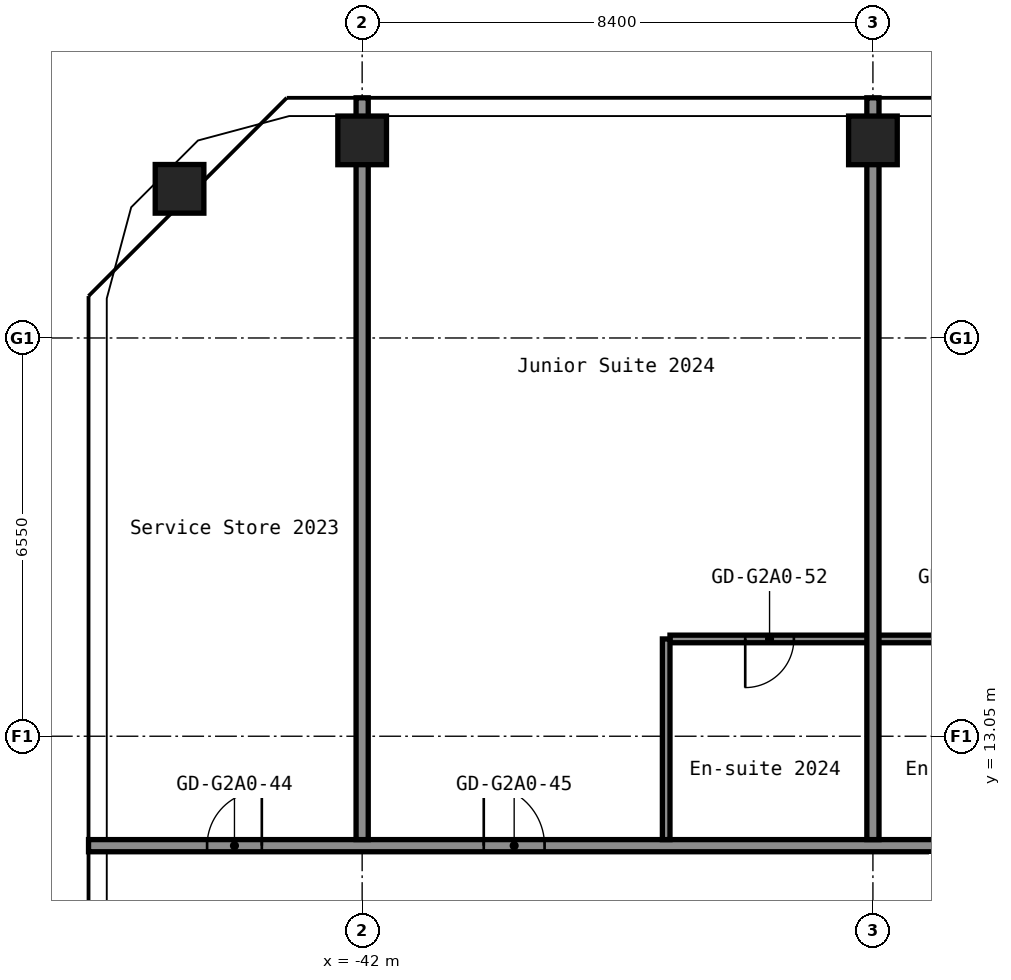
"""IFC4 building model, lengths in metres.
Left out: names, types, materials, properties, quantities, classifications, styles, units other than length and angle.
Written with IfcOpenShell. Run it as: python <this file> out.ifc"""

import sys

from ifc_helpers import new_model, si_unit, direction, frame, frame_2d, origin, origin_2d, place, context, subcontext, project, spatial, rectangle, hollow_rectangle, extrude, element, fill, save


model = new_model("IFC4")
c1 = context("Model", 3, precision=1e-05, world=origin(), true_north=direction((0.0, 1.0)))
c2 = subcontext(c1, "Body", "Model", "MODEL_VIEW")
j1 = project(units=[si_unit("LENGTHUNIT", "METRE"), si_unit("PLANEANGLEUNIT", "RADIAN")], contexts=[c1])
p1 = place(None, origin())
s1 = spatial("IfcSite", under=j1, at=p1, CompositionType="ELEMENT")
p2 = place(p1, origin())
s2 = spatial("IfcBuilding", under=s1, at=p2, CompositionType="ELEMENT")
p3 = place(p2, frame((0.0, 0.0, 75.4)))
s3 = spatial("IfcBuildingStorey", under=s2, at=p3, CompositionType="ELEMENT", Elevation=75.4)
for number, where, z_axis, x_axis in (
    (1, (-45.003, 22.053, 0.0), (0.0, 0.0, 1.0), (1.0, 0.0, 0.0)),
    (2, (-42.0, 22.85, 0.0), (0.0, 0.0, 1.0), (1.0, 0.0, 0.0)),
    (3, (-33.6, 22.85, 0.0), (0.0, 0.0, 1.0), (1.0, 0.0, 0.0)),
):
    element("IfcColumn", number, at=place(p3, frame(where, z_axis=z_axis, x_axis=x_axis)), inside=s3, PredefinedType="COLUMN", context=c2, shape_type="SweptSolid", body=[
        extrude(hollow_rectangle(XDim=0.8, YDim=0.8, WallThickness=0.032, at=origin_2d()), origin(), (0.0, 0.0, 1.0), 2.8),
    ])
p4 = place(p3, frame((-46.5, 11.25, 0.0), z_axis=(0.0, 0.0, 1.0), x_axis=(1.0, 0.0, 0.0)))
e4 = element("IfcWall", 4, at=p4, inside=s3, PredefinedType="PARTITIONING", context=c2, shape_type="SweptSolid", body=[
    extrude(rectangle(XDim=29.7, YDim=0.2, at=frame_2d((14.85, 0.0))), origin(), (0.0, 0.0, 1.0), 2.8),
])
p5 = place(p4, frame((1.95, 0.0, 0.0)))
e5 = element("IfcOpeningElement", 5, at=p5, cuts=e4, PredefinedType="OPENING", context=c2, shape_type="SweptSolid", body=[
    extrude(rectangle(XDim=0.9, YDim=2.1, at=frame_2d((0.45, 1.05))), frame((0.0, 0.11, 0.0), z_axis=(0.0, -1.0, 0.0), x_axis=(1.0, 0.0, 0.0)), (0.0, 0.0, 1.0), 0.22),
])
p6 = place(p4, frame((6.5, 0.0, 0.0)))
e6 = element("IfcOpeningElement", 6, at=p6, cuts=e4, PredefinedType="OPENING", context=c2, shape_type="SweptSolid", body=[
    extrude(rectangle(XDim=1.0, YDim=2.1, at=frame_2d((0.5, 1.05))), frame((0.0, 0.11, 0.0), z_axis=(0.0, -1.0, 0.0), x_axis=(1.0, 0.0, 0.0)), (0.0, 0.0, 1.0), 0.22),
])
p7 = place(p4, frame((18.3, 0.0, 0.0)))
e7 = element("IfcOpeningElement", 7, at=p7, cuts=e4, PredefinedType="OPENING", context=c2, shape_type="SweptSolid", body=[
    extrude(rectangle(XDim=1.0, YDim=2.1, at=frame_2d((0.5, 1.05))), frame((0.0, 0.11, 0.0), z_axis=(0.0, -1.0, 0.0), x_axis=(1.0, 0.0, 0.0)), (0.0, 0.0, 1.0), 0.22),
])
p8 = place(p4, frame((23.3, 0.0, 0.0)))
e8 = element("IfcOpeningElement", 8, at=p8, cuts=e4, PredefinedType="OPENING", context=c2, shape_type="SweptSolid", body=[
    extrude(rectangle(XDim=1.0, YDim=2.1, at=frame_2d((0.5, 1.05))), frame((0.0, 0.11, 0.0), z_axis=(0.0, -1.0, 0.0), x_axis=(1.0, 0.0, 0.0)), (0.0, 0.0, 1.0), 0.22),
])
p9 = place(p3, frame((-36.938, 14.65, 0.0), z_axis=(0.0, 0.0, 1.0), x_axis=(1.0, 0.0, 0.0)))
e9 = element("IfcWall", 9, at=p9, inside=s3, PredefinedType="PARTITIONING", context=c2, shape_type="SweptSolid", body=[
    extrude(rectangle(XDim=6.675, YDim=0.125, at=frame_2d((3.337, 0.0))), origin(), (0.0, 0.0, 1.0), 2.8),
])
p10 = place(p9, frame((1.238, 0.0, 0.0)))
e10 = element("IfcOpeningElement", 10, at=p10, cuts=e9, PredefinedType="OPENING", context=c2, shape_type="SweptSolid", body=[
    extrude(rectangle(XDim=0.8, YDim=2.1, at=frame_2d((0.4, 1.05))), frame((0.0, 0.073, 0.0), z_axis=(0.0, -1.0, 0.0), x_axis=(1.0, 0.0, 0.0)), (0.0, 0.0, 1.0), 0.145),
])
p11 = place(p9, frame((4.637, 0.0, 0.0)))
e11 = element("IfcOpeningElement", 11, at=p11, cuts=e9, PredefinedType="OPENING", context=c2, shape_type="SweptSolid", body=[
    extrude(rectangle(XDim=0.8, YDim=2.1, at=frame_2d((0.4, 1.05))), frame((0.0, 0.073, 0.0), z_axis=(0.0, -1.0, 0.0), x_axis=(1.0, 0.0, 0.0)), (0.0, 0.0, 1.0), 0.145),
])
p12 = place(p3, frame((-42.0, 11.35, 0.0), z_axis=(0.0, 0.0, 1.0), x_axis=(0.0, 1.0, 0.0)))
e12 = element("IfcWall", 12, at=p12, inside=s3, PredefinedType="PARTITIONING", context=c2, shape_type="SweptSolid", body=[
    extrude(rectangle(XDim=12.2, YDim=0.2, at=frame_2d((6.1, 0.0))), origin(), (0.0, 0.0, 1.0), 2.8),
])
p13 = place(p3, frame((-37.0, 11.35, 0.0), z_axis=(0.0, 0.0, 1.0), x_axis=(0.0, 1.0, 0.0)))
e13 = element("IfcWall", 13, at=p13, inside=s3, PredefinedType="PARTITIONING", context=c2, shape_type="SweptSolid", body=[
    extrude(rectangle(XDim=3.3, YDim=0.125, at=frame_2d((1.65, 0.0))), origin(), (0.0, 0.0, 1.0), 2.8),
])
p14 = place(p3, frame((-33.6, 11.35, 0.0), z_axis=(0.0, 0.0, 1.0), x_axis=(0.0, 1.0, 0.0)))
e14 = element("IfcWall", 14, at=p14, inside=s3, PredefinedType="PARTITIONING", context=c2, shape_type="SweptSolid", body=[
    extrude(rectangle(XDim=12.2, YDim=0.2, at=frame_2d((6.1, 0.0))), origin(), (0.0, 0.0, 1.0), 2.8),
])
p15 = place(p5, origin())
e15 = element("IfcDoor", 15, at=p15, inside=s3, OperationType="SINGLE_SWING_LEFT", PredefinedType="DOOR", context=c2, shape_type="SweptSolid", body=[
    extrude(rectangle(XDim=0.9, YDim=2.1, at=frame_2d((0.45, 1.05))), frame((0.0, 0.025, 0.0), z_axis=(0.0, -1.0, 0.0), x_axis=(1.0, 0.0, 0.0)), (0.0, 0.0, 1.0), 0.05),
])
fill(e5, e15)
p16 = place(p6, origin())
e16 = element("IfcDoor", 16, at=p16, inside=s3, OperationType="SINGLE_SWING_RIGHT", PredefinedType="DOOR", context=c2, shape_type="SweptSolid", body=[
    extrude(rectangle(XDim=1.0, YDim=2.1, at=frame_2d((0.5, 1.05))), frame((0.0, 0.025, 0.0), z_axis=(0.0, -1.0, 0.0), x_axis=(1.0, 0.0, 0.0)), (0.0, 0.0, 1.0), 0.05),
])
fill(e6, e16)
p17 = place(p10, origin())
e17 = element("IfcDoor", 17, at=p17, inside=s3, OperationType="SINGLE_SWING_LEFT", PredefinedType="DOOR", context=c2, shape_type="SweptSolid", body=[
    extrude(rectangle(XDim=0.8, YDim=2.1, at=frame_2d((0.4, 1.05))), frame((0.0, 0.025, 0.0), z_axis=(0.0, -1.0, 0.0), x_axis=(1.0, 0.0, 0.0)), (0.0, 0.0, 1.0), 0.05),
])
fill(e10, e17)
save(model, sys.argv[1])
